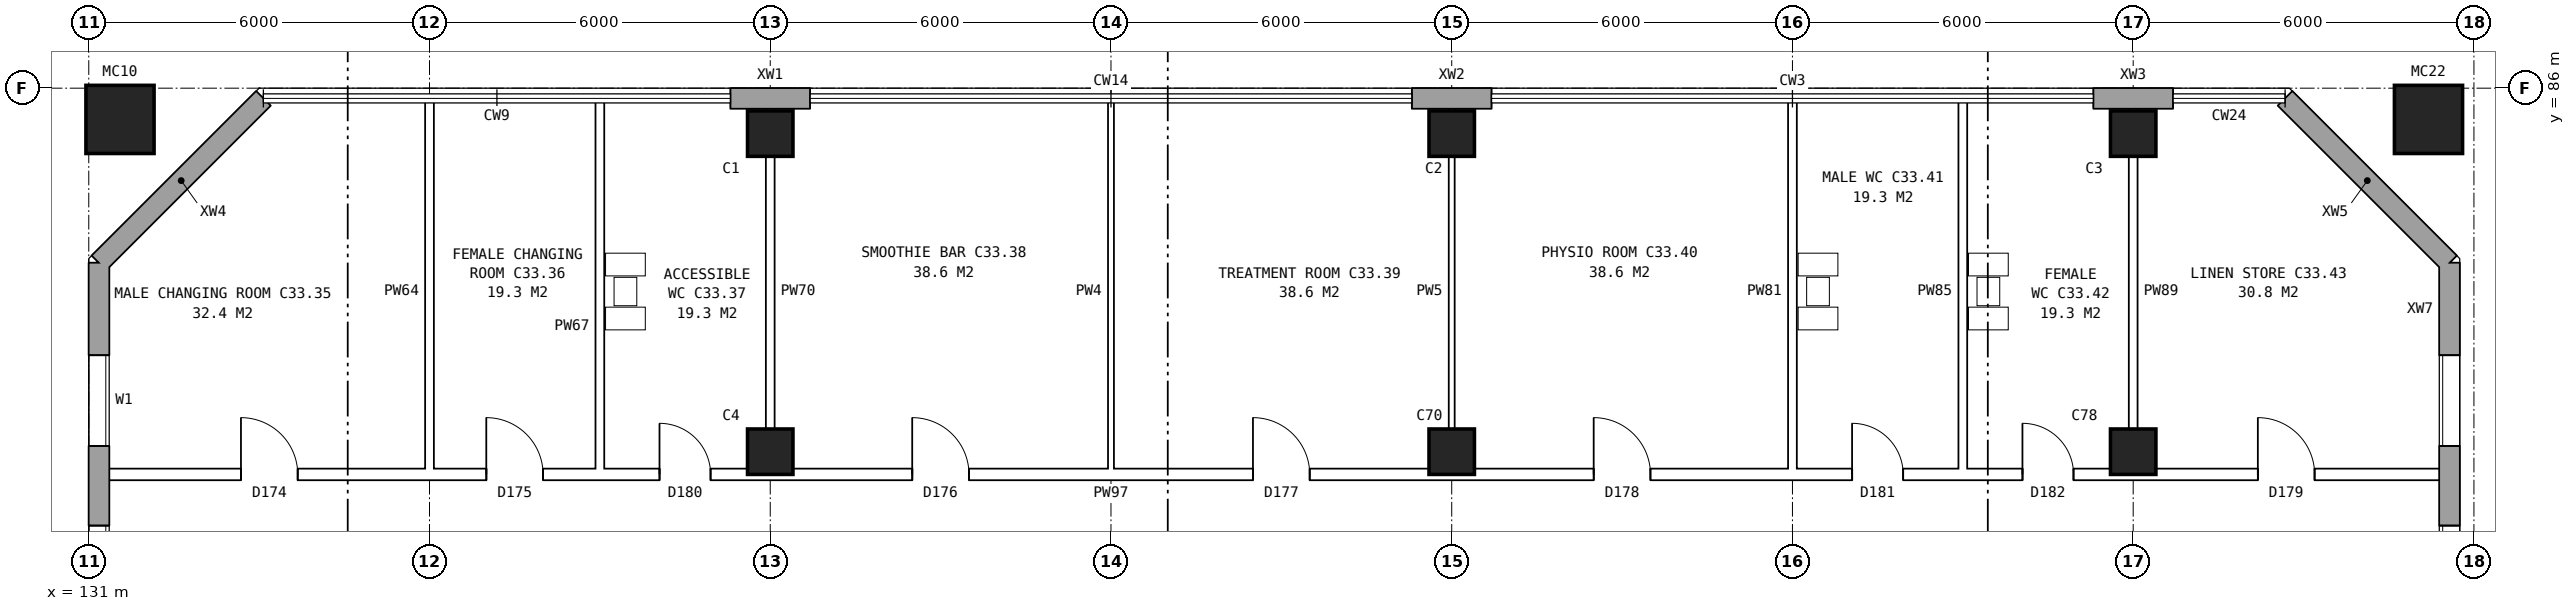
"""IFC4 building model, lengths in metres.
Left out: names, types, materials, properties, quantities, classifications, styles, units other than length and angle.
Written with IfcOpenShell. Run it as: python <this file> out.ifc"""

import sys

from ifc_helpers import new_model, si_unit, direction, frame, frame_2d, origin, origin_2d, place, context, subcontext, project, spatial, rectangle, hollow_rectangle, extrude, element, fill, save


model = new_model("IFC4")
c1 = context("Model", 3, precision=1e-05, world=origin(), true_north=direction((0.0, 1.0)))
c2 = subcontext(c1, "Body", "Model", "MODEL_VIEW")
j1 = project(units=[si_unit("LENGTHUNIT", "METRE"), si_unit("PLANEANGLEUNIT", "RADIAN")], contexts=[c1])
p1 = place(None, origin())
s1 = spatial("IfcSite", under=j1, at=p1, CompositionType="ELEMENT")
p2 = place(p1, origin())
s2 = spatial("IfcBuilding", under=s1, at=p2, CompositionType="ELEMENT")
p3 = place(p2, frame((0.0, 0.0, 119.5)))
s3 = spatial("IfcBuildingStorey", under=s2, at=p3, CompositionType="ELEMENT", Elevation=119.5)
for number, where, z_axis, x_axis in (
    (1, (143.0, 79.6, 0.0), (0.0, 0.0, 1.0), (1.0, 0.0, 0.0)),
    (2, (143.0, 85.2, 0.0), (0.0, 0.0, 1.0), (1.0, 0.0, 0.0)),
    (3, (155.0, 79.6, 0.0), (0.0, 0.0, 1.0), (1.0, 0.0, 0.0)),
    (4, (155.0, 85.2, 0.0), (0.0, 0.0, 1.0), (1.0, 0.0, 0.0)),
    (5, (167.0, 79.6, 0.0), (0.0, 0.0, 1.0), (1.0, 0.0, 0.0)),
    (6, (167.0, 85.2, 0.0), (0.0, 0.0, 1.0), (1.0, 0.0, 0.0)),
):
    element("IfcColumn", number, at=place(p3, frame(where, z_axis=z_axis, x_axis=x_axis)), inside=s3, PredefinedType="COLUMN", context=c2, shape_type="SweptSolid", body=[
        extrude(rectangle(XDim=0.8, YDim=0.8, at=origin_2d()), origin(), (0.0, 0.0, 1.0), 3.6),
    ])
for number, where, z_axis, x_axis in (
    (7, (172.2, 85.45, 0.0), (0.0, 0.0, 1.0), (1.0, 0.0, 0.0)),
    (8, (131.55, 85.45, 0.0), (0.0, 0.0, 1.0), (1.0, 0.0, 0.0)),
):
    element("IfcColumn", number, at=place(p3, frame(where, z_axis=z_axis, x_axis=x_axis)), inside=s3, PredefinedType="COLUMN", context=c2, shape_type="SweptSolid", body=[
        extrude(hollow_rectangle(XDim=1.2, YDim=1.2, WallThickness=0.065, at=origin_2d()), origin(), (0.0, 0.0, 1.0), 4.2),
    ])
p4 = place(p3, frame((172.57, 57.075, 0.0), z_axis=(0.0, 0.0, 1.0), x_axis=(0.0, 1.0, 0.0)))
e9 = element("IfcWall", 9, at=p4, inside=s3, PredefinedType="STANDARD", context=c2, shape_type="SweptSolid", body=[
    extrude(rectangle(XDim=25.851, YDim=0.36, at=frame_2d((12.925, 0.0))), origin(), (0.0, 0.0, 1.0), 3.6),
])
p5 = place(p4, frame((1.625, 0.0, 0.8)))
e10 = element("IfcOpeningElement", 10, at=p5, cuts=e9, PredefinedType="OPENING", context=c2, shape_type="SweptSolid", body=[
    extrude(rectangle(XDim=1.6, YDim=1.8, at=frame_2d((0.8, 0.9))), frame((0.0, 0.19, 0.0), z_axis=(0.0, -1.0, 0.0), x_axis=(1.0, 0.0, 0.0)), (0.0, 0.0, 1.0), 0.38),
])
p6 = place(p4, frame((4.625, 0.0, 0.8)))
e11 = element("IfcOpeningElement", 11, at=p6, cuts=e9, PredefinedType="OPENING", context=c2, shape_type="SweptSolid", body=[
    extrude(rectangle(XDim=1.6, YDim=1.8, at=frame_2d((0.8, 0.9))), frame((0.0, 0.19, 0.0), z_axis=(0.0, -1.0, 0.0), x_axis=(1.0, 0.0, 0.0)), (0.0, 0.0, 1.0), 0.38),
])
p7 = place(p4, frame((7.625, 0.0, 0.8)))
e12 = element("IfcOpeningElement", 12, at=p7, cuts=e9, PredefinedType="OPENING", context=c2, shape_type="SweptSolid", body=[
    extrude(rectangle(XDim=1.6, YDim=1.8, at=frame_2d((0.8, 0.9))), frame((0.0, 0.19, 0.0), z_axis=(0.0, -1.0, 0.0), x_axis=(1.0, 0.0, 0.0)), (0.0, 0.0, 1.0), 0.38),
])
p8 = place(p4, frame((10.625, 0.0, 0.8)))
e13 = element("IfcOpeningElement", 13, at=p8, cuts=e9, PredefinedType="OPENING", context=c2, shape_type="SweptSolid", body=[
    extrude(rectangle(XDim=1.6, YDim=1.8, at=frame_2d((0.8, 0.9))), frame((0.0, 0.19, 0.0), z_axis=(0.0, -1.0, 0.0), x_axis=(1.0, 0.0, 0.0)), (0.0, 0.0, 1.0), 0.38),
])
p9 = place(p4, frame((13.625, 0.0, 0.8)))
e14 = element("IfcOpeningElement", 14, at=p9, cuts=e9, PredefinedType="OPENING", context=c2, shape_type="SweptSolid", body=[
    extrude(rectangle(XDim=1.6, YDim=1.8, at=frame_2d((0.8, 0.9))), frame((0.0, 0.19, 0.0), z_axis=(0.0, -1.0, 0.0), x_axis=(1.0, 0.0, 0.0)), (0.0, 0.0, 1.0), 0.38),
])
p10 = place(p4, frame((16.625, 0.0, 0.8)))
e15 = element("IfcOpeningElement", 15, at=p10, cuts=e9, PredefinedType="OPENING", context=c2, shape_type="SweptSolid", body=[
    extrude(rectangle(XDim=1.6, YDim=1.8, at=frame_2d((0.8, 0.9))), frame((0.0, 0.19, 0.0), z_axis=(0.0, -1.0, 0.0), x_axis=(1.0, 0.0, 0.0)), (0.0, 0.0, 1.0), 0.38),
])
p11 = place(p4, frame((19.625, 0.0, 0.8)))
e16 = element("IfcOpeningElement", 16, at=p11, cuts=e9, PredefinedType="OPENING", context=c2, shape_type="SweptSolid", body=[
    extrude(rectangle(XDim=1.6, YDim=1.8, at=frame_2d((0.8, 0.9))), frame((0.0, 0.19, 0.0), z_axis=(0.0, -1.0, 0.0), x_axis=(1.0, 0.0, 0.0)), (0.0, 0.0, 1.0), 0.38),
])
p12 = place(p4, frame((22.625, 0.0, 0.8)))
e17 = element("IfcOpeningElement", 17, at=p12, cuts=e9, PredefinedType="OPENING", context=c2, shape_type="SweptSolid", body=[
    extrude(rectangle(XDim=1.6, YDim=1.8, at=frame_2d((0.8, 0.9))), frame((0.0, 0.19, 0.0), z_axis=(0.0, -1.0, 0.0), x_axis=(1.0, 0.0, 0.0)), (0.0, 0.0, 1.0), 0.38),
])
p13 = place(p3, frame((172.57, 82.925, 0.0), z_axis=(0.0, 0.0, 1.0), x_axis=(-0.707106781187, 0.707106781187, 0.0)))
e18 = element("IfcWall", 18, at=p13, inside=s3, PredefinedType="STANDARD", context=c2, shape_type="SweptSolid", body=[
    extrude(rectangle(XDim=4.094, YDim=0.36, at=frame_2d((2.047, 0.0))), origin(), (0.0, 0.0, 1.0), 3.6),
])
for number, where, z_axis, x_axis in (
    (19, (167.7, 85.82, 0.0), (0.0, 0.0, 1.0), (-1.0, 0.0, 0.0)),
    (20, (155.7, 85.82, 0.0), (0.0, 0.0, 1.0), (-1.0, 0.0, 0.0)),
    (21, (143.7, 85.82, 0.0), (0.0, 0.0, 1.0), (-1.0, 0.0, 0.0)),
):
    element("IfcWall", number, at=place(p3, frame(where, z_axis=z_axis, x_axis=x_axis)), inside=s3, PredefinedType="STANDARD", context=c2, shape_type="SweptSolid", body=[
        extrude(rectangle(XDim=1.4, YDim=0.36, at=frame_2d((0.7, 0.0))), origin(), (0.0, 0.0, 1.0), 3.6),
    ])
p14 = place(p3, frame((134.075, 85.82, 0.0), z_axis=(0.0, 0.0, 1.0), x_axis=(-0.707106781187, -0.707106781187, 0.0)))
e22 = element("IfcWall", 22, at=p14, inside=s3, PredefinedType="STANDARD", context=c2, shape_type="SweptSolid", body=[
    extrude(rectangle(XDim=4.094, YDim=0.36, at=frame_2d((2.047, 0.0))), origin(), (0.0, 0.0, 1.0), 3.6),
])
p15 = place(p3, frame((131.18, 82.925, 0.0), z_axis=(0.0, 0.0, 1.0), x_axis=(0.0, -1.0, 0.0)))
e23 = element("IfcWall", 23, at=p15, inside=s3, PredefinedType="STANDARD", context=c2, shape_type="SweptSolid", body=[
    extrude(rectangle(XDim=25.851, YDim=0.36, at=frame_2d((12.925, 0.0))), origin(), (0.0, 0.0, 1.0), 3.6),
])
p16 = place(p15, frame((1.625, 0.0, 0.8)))
e24 = element("IfcOpeningElement", 24, at=p16, cuts=e23, PredefinedType="OPENING", context=c2, shape_type="SweptSolid", body=[
    extrude(rectangle(XDim=1.6, YDim=1.8, at=frame_2d((0.8, 0.9))), frame((0.0, 0.19, 0.0), z_axis=(0.0, -1.0, 0.0), x_axis=(1.0, 0.0, 0.0)), (0.0, 0.0, 1.0), 0.38),
])
p17 = place(p15, frame((4.625, 0.0, 0.8)))
e25 = element("IfcOpeningElement", 25, at=p17, cuts=e23, PredefinedType="OPENING", context=c2, shape_type="SweptSolid", body=[
    extrude(rectangle(XDim=1.6, YDim=1.8, at=frame_2d((0.8, 0.9))), frame((0.0, 0.19, 0.0), z_axis=(0.0, -1.0, 0.0), x_axis=(1.0, 0.0, 0.0)), (0.0, 0.0, 1.0), 0.38),
])
p18 = place(p15, frame((19.625, 0.0, 0.8)))
e26 = element("IfcOpeningElement", 26, at=p18, cuts=e23, PredefinedType="OPENING", context=c2, shape_type="SweptSolid", body=[
    extrude(rectangle(XDim=1.6, YDim=1.8, at=frame_2d((0.8, 0.9))), frame((0.0, 0.19, 0.0), z_axis=(0.0, -1.0, 0.0), x_axis=(1.0, 0.0, 0.0)), (0.0, 0.0, 1.0), 0.38),
])
p19 = place(p15, frame((22.625, 0.0, 0.8)))
e27 = element("IfcOpeningElement", 27, at=p19, cuts=e23, PredefinedType="OPENING", context=c2, shape_type="SweptSolid", body=[
    extrude(rectangle(XDim=1.6, YDim=1.8, at=frame_2d((0.8, 0.9))), frame((0.0, 0.19, 0.0), z_axis=(0.0, -1.0, 0.0), x_axis=(1.0, 0.0, 0.0)), (0.0, 0.0, 1.0), 0.38),
])
p20 = place(p3, frame((131.24, 79.2, 0.0), z_axis=(0.0, 0.0, 1.0), x_axis=(1.0, 0.0, 0.0)))
e28 = element("IfcWall", 28, at=p20, inside=s3, PredefinedType="PARTITIONING", context=c2, shape_type="SweptSolid", body=[
    extrude(rectangle(XDim=41.27, YDim=0.2, at=frame_2d((20.635, 0.0))), origin(), (0.0, 0.0, 1.0), 3.6),
])
p21 = place(p20, frame((2.44, 0.0, 0.0)))
e29 = element("IfcOpeningElement", 29, at=p21, cuts=e28, PredefinedType="OPENING", context=c2, shape_type="SweptSolid", body=[
    extrude(rectangle(XDim=1.0, YDim=2.1, at=frame_2d((0.5, 1.05))), frame((0.0, 0.11, 0.0), z_axis=(0.0, -1.0, 0.0), x_axis=(1.0, 0.0, 0.0)), (0.0, 0.0, 1.0), 0.22),
])
p22 = place(p20, frame((6.76, 0.0, 0.0)))
e30 = element("IfcOpeningElement", 30, at=p22, cuts=e28, PredefinedType="OPENING", context=c2, shape_type="SweptSolid", body=[
    extrude(rectangle(XDim=1.0, YDim=2.1, at=frame_2d((0.5, 1.05))), frame((0.0, 0.11, 0.0), z_axis=(0.0, -1.0, 0.0), x_axis=(1.0, 0.0, 0.0)), (0.0, 0.0, 1.0), 0.22),
])
p23 = place(p20, frame((9.81, 0.0, 0.0)))
e31 = element("IfcOpeningElement", 31, at=p23, cuts=e28, PredefinedType="OPENING", context=c2, shape_type="SweptSolid", body=[
    extrude(rectangle(XDim=0.9, YDim=2.1, at=frame_2d((0.45, 1.05))), frame((0.0, 0.11, 0.0), z_axis=(0.0, -1.0, 0.0), x_axis=(1.0, 0.0, 0.0)), (0.0, 0.0, 1.0), 0.22),
])
p24 = place(p20, frame((14.26, 0.0, 0.0)))
e32 = element("IfcOpeningElement", 32, at=p24, cuts=e28, PredefinedType="OPENING", context=c2, shape_type="SweptSolid", body=[
    extrude(rectangle(XDim=1.0, YDim=2.1, at=frame_2d((0.5, 1.05))), frame((0.0, 0.11, 0.0), z_axis=(0.0, -1.0, 0.0), x_axis=(1.0, 0.0, 0.0)), (0.0, 0.0, 1.0), 0.22),
])
p25 = place(p20, frame((20.26, 0.0, 0.0)))
e33 = element("IfcOpeningElement", 33, at=p25, cuts=e28, PredefinedType="OPENING", context=c2, shape_type="SweptSolid", body=[
    extrude(rectangle(XDim=1.0, YDim=2.1, at=frame_2d((0.5, 1.05))), frame((0.0, 0.11, 0.0), z_axis=(0.0, -1.0, 0.0), x_axis=(1.0, 0.0, 0.0)), (0.0, 0.0, 1.0), 0.22),
])
p26 = place(p20, frame((26.26, 0.0, 0.0)))
e34 = element("IfcOpeningElement", 34, at=p26, cuts=e28, PredefinedType="OPENING", context=c2, shape_type="SweptSolid", body=[
    extrude(rectangle(XDim=1.0, YDim=2.1, at=frame_2d((0.5, 1.05))), frame((0.0, 0.11, 0.0), z_axis=(0.0, -1.0, 0.0), x_axis=(1.0, 0.0, 0.0)), (0.0, 0.0, 1.0), 0.22),
])
p27 = place(p20, frame((30.81, 0.0, 0.0)))
e35 = element("IfcOpeningElement", 35, at=p27, cuts=e28, PredefinedType="OPENING", context=c2, shape_type="SweptSolid", body=[
    extrude(rectangle(XDim=0.9, YDim=2.1, at=frame_2d((0.45, 1.05))), frame((0.0, 0.11, 0.0), z_axis=(0.0, -1.0, 0.0), x_axis=(1.0, 0.0, 0.0)), (0.0, 0.0, 1.0), 0.22),
])
p28 = place(p20, frame((33.81, 0.0, 0.0)))
e36 = element("IfcOpeningElement", 36, at=p28, cuts=e28, PredefinedType="OPENING", context=c2, shape_type="SweptSolid", body=[
    extrude(rectangle(XDim=0.9, YDim=2.1, at=frame_2d((0.45, 1.05))), frame((0.0, 0.11, 0.0), z_axis=(0.0, -1.0, 0.0), x_axis=(1.0, 0.0, 0.0)), (0.0, 0.0, 1.0), 0.22),
])
p29 = place(p20, frame((37.955, 0.0, 0.0)))
e37 = element("IfcOpeningElement", 37, at=p29, cuts=e28, PredefinedType="OPENING", context=c2, shape_type="SweptSolid", body=[
    extrude(rectangle(XDim=1.0, YDim=2.1, at=frame_2d((0.5, 1.05))), frame((0.0, 0.11, 0.0), z_axis=(0.0, -1.0, 0.0), x_axis=(1.0, 0.0, 0.0)), (0.0, 0.0, 1.0), 0.22),
])
for number, where, z_axis, x_axis in (
    (38, (137.0, 79.1, 0.0), (0.0, 0.0, 1.0), (0.0, 1.0, 0.0)),
    (39, (140.0, 79.1, 0.0), (0.0, 0.0, 1.0), (0.0, 1.0, 0.0)),
    (40, (143.0, 79.1, 0.0), (0.0, 0.0, 1.0), (0.0, 1.0, 0.0)),
):
    element("IfcWall", number, at=place(p3, frame(where, z_axis=z_axis, x_axis=x_axis)), inside=s3, PredefinedType="PLUMBINGWALL", context=c2, shape_type="SweptSolid", body=[
        extrude(rectangle(XDim=6.66, YDim=0.15, at=frame_2d((3.33, 0.0))), origin(), (0.0, 0.0, 1.0), 3.6),
    ])
for number, where, z_axis, x_axis in (
    (41, (149.0, 79.1, 0.0), (0.0, 0.0, 1.0), (0.0, 1.0, 0.0)),
    (42, (155.0, 79.1, 0.0), (0.0, 0.0, 1.0), (0.0, 1.0, 0.0)),
):
    element("IfcWall", number, at=place(p3, frame(where, z_axis=z_axis, x_axis=x_axis)), inside=s3, PredefinedType="PARTITIONING", context=c2, shape_type="SweptSolid", body=[
        extrude(rectangle(XDim=6.66, YDim=0.1, at=frame_2d((3.33, 0.0))), origin(), (0.0, 0.0, 1.0), 3.6),
    ])
for number, where, z_axis, x_axis in (
    (43, (161.0, 79.1, 0.0), (0.0, 0.0, 1.0), (0.0, 1.0, 0.0)),
    (44, (164.0, 79.1, 0.0), (0.0, 0.0, 1.0), (0.0, 1.0, 0.0)),
    (45, (167.0, 79.1, 0.0), (0.0, 0.0, 1.0), (0.0, 1.0, 0.0)),
):
    element("IfcWall", number, at=place(p3, frame(where, z_axis=z_axis, x_axis=x_axis)), inside=s3, PredefinedType="PLUMBINGWALL", context=c2, shape_type="SweptSolid", body=[
        extrude(rectangle(XDim=6.66, YDim=0.15, at=frame_2d((3.33, 0.0))), origin(), (0.0, 0.0, 1.0), 3.6),
    ])
p30 = place(p11, origin())
e46 = element("IfcWindow", 46, at=p30, inside=s3, PartitioningType="SINGLE_PANEL", PredefinedType="WINDOW", context=c2, shape_type="SweptSolid", body=[
    extrude(rectangle(XDim=1.6, YDim=1.8, at=frame_2d((0.8, 0.9))), frame((0.0, 0.15, 0.0), z_axis=(0.0, -1.0, 0.0), x_axis=(1.0, 0.0, 0.0)), (0.0, 0.0, 1.0), 0.06),
])
fill(e16, e46)
p31 = place(p12, origin())
e47 = element("IfcWindow", 47, at=p31, inside=s3, PartitioningType="SINGLE_PANEL", PredefinedType="WINDOW", context=c2, shape_type="SweptSolid", body=[
    extrude(rectangle(XDim=1.6, YDim=1.8, at=frame_2d((0.8, 0.9))), frame((0.0, 0.15, 0.0), z_axis=(0.0, -1.0, 0.0), x_axis=(1.0, 0.0, 0.0)), (0.0, 0.0, 1.0), 0.06),
])
fill(e17, e47)
p32 = place(p16, origin())
e48 = element("IfcWindow", 48, at=p32, inside=s3, PartitioningType="SINGLE_PANEL", PredefinedType="WINDOW", context=c2, shape_type="SweptSolid", body=[
    extrude(rectangle(XDim=1.6, YDim=1.8, at=frame_2d((0.8, 0.9))), frame((0.0, 0.15, 0.0), z_axis=(0.0, -1.0, 0.0), x_axis=(1.0, 0.0, 0.0)), (0.0, 0.0, 1.0), 0.06),
])
fill(e24, e48)
p33 = place(p17, origin())
e49 = element("IfcWindow", 49, at=p33, inside=s3, PartitioningType="SINGLE_PANEL", PredefinedType="WINDOW", context=c2, shape_type="SweptSolid", body=[
    extrude(rectangle(XDim=1.6, YDim=1.8, at=frame_2d((0.8, 0.9))), frame((0.0, 0.15, 0.0), z_axis=(0.0, -1.0, 0.0), x_axis=(1.0, 0.0, 0.0)), (0.0, 0.0, 1.0), 0.06),
])
fill(e25, e49)
p34 = place(p21, origin())
e50 = element("IfcDoor", 50, at=p34, inside=s3, OperationType="SINGLE_SWING_LEFT", PredefinedType="DOOR", context=c2, shape_type="SweptSolid", body=[
    extrude(rectangle(XDim=1.0, YDim=2.1, at=frame_2d((0.5, 1.05))), frame((0.0, 0.025, 0.0), z_axis=(0.0, -1.0, 0.0), x_axis=(1.0, 0.0, 0.0)), (0.0, 0.0, 1.0), 0.05),
])
fill(e29, e50)
p35 = place(p22, origin())
e51 = element("IfcDoor", 51, at=p35, inside=s3, OperationType="SINGLE_SWING_LEFT", PredefinedType="DOOR", context=c2, shape_type="SweptSolid", body=[
    extrude(rectangle(XDim=1.0, YDim=2.1, at=frame_2d((0.5, 1.05))), frame((0.0, 0.025, 0.0), z_axis=(0.0, -1.0, 0.0), x_axis=(1.0, 0.0, 0.0)), (0.0, 0.0, 1.0), 0.05),
])
fill(e30, e51)
p36 = place(p23, origin())
e52 = element("IfcDoor", 52, at=p36, inside=s3, OperationType="SINGLE_SWING_LEFT", PredefinedType="DOOR", context=c2, shape_type="SweptSolid", body=[
    extrude(rectangle(XDim=0.9, YDim=2.1, at=frame_2d((0.45, 1.05))), frame((0.0, 0.025, 0.0), z_axis=(0.0, -1.0, 0.0), x_axis=(1.0, 0.0, 0.0)), (0.0, 0.0, 1.0), 0.05),
])
fill(e31, e52)
p37 = place(p24, origin())
e53 = element("IfcDoor", 53, at=p37, inside=s3, OperationType="SINGLE_SWING_LEFT", PredefinedType="DOOR", context=c2, shape_type="SweptSolid", body=[
    extrude(rectangle(XDim=1.0, YDim=2.1, at=frame_2d((0.5, 1.05))), frame((0.0, 0.025, 0.0), z_axis=(0.0, -1.0, 0.0), x_axis=(1.0, 0.0, 0.0)), (0.0, 0.0, 1.0), 0.05),
])
fill(e32, e53)
p38 = place(p25, origin())
e54 = element("IfcDoor", 54, at=p38, inside=s3, OperationType="SINGLE_SWING_LEFT", PredefinedType="DOOR", context=c2, shape_type="SweptSolid", body=[
    extrude(rectangle(XDim=1.0, YDim=2.1, at=frame_2d((0.5, 1.05))), frame((0.0, 0.025, 0.0), z_axis=(0.0, -1.0, 0.0), x_axis=(1.0, 0.0, 0.0)), (0.0, 0.0, 1.0), 0.05),
])
fill(e33, e54)
p39 = place(p26, origin())
e55 = element("IfcDoor", 55, at=p39, inside=s3, OperationType="SINGLE_SWING_LEFT", PredefinedType="DOOR", context=c2, shape_type="SweptSolid", body=[
    extrude(rectangle(XDim=1.0, YDim=2.1, at=frame_2d((0.5, 1.05))), frame((0.0, 0.025, 0.0), z_axis=(0.0, -1.0, 0.0), x_axis=(1.0, 0.0, 0.0)), (0.0, 0.0, 1.0), 0.05),
])
fill(e34, e55)
p40 = place(p27, origin())
e56 = element("IfcDoor", 56, at=p40, inside=s3, OperationType="SINGLE_SWING_LEFT", PredefinedType="DOOR", context=c2, shape_type="SweptSolid", body=[
    extrude(rectangle(XDim=0.9, YDim=2.1, at=frame_2d((0.45, 1.05))), frame((0.0, 0.025, 0.0), z_axis=(0.0, -1.0, 0.0), x_axis=(1.0, 0.0, 0.0)), (0.0, 0.0, 1.0), 0.05),
])
fill(e35, e56)
p41 = place(p28, origin())
e57 = element("IfcDoor", 57, at=p41, inside=s3, OperationType="SINGLE_SWING_LEFT", PredefinedType="DOOR", context=c2, shape_type="SweptSolid", body=[
    extrude(rectangle(XDim=0.9, YDim=2.1, at=frame_2d((0.45, 1.05))), frame((0.0, 0.025, 0.0), z_axis=(0.0, -1.0, 0.0), x_axis=(1.0, 0.0, 0.0)), (0.0, 0.0, 1.0), 0.05),
])
fill(e36, e57)
p42 = place(p29, origin())
e58 = element("IfcDoor", 58, at=p42, inside=s3, OperationType="SINGLE_SWING_LEFT", PredefinedType="DOOR", context=c2, shape_type="SweptSolid", body=[
    extrude(rectangle(XDim=1.0, YDim=2.1, at=frame_2d((0.5, 1.05))), frame((0.0, 0.025, 0.0), z_axis=(0.0, -1.0, 0.0), x_axis=(1.0, 0.0, 0.0)), (0.0, 0.0, 1.0), 0.05),
])
fill(e37, e58)
save(model, sys.argv[1])
